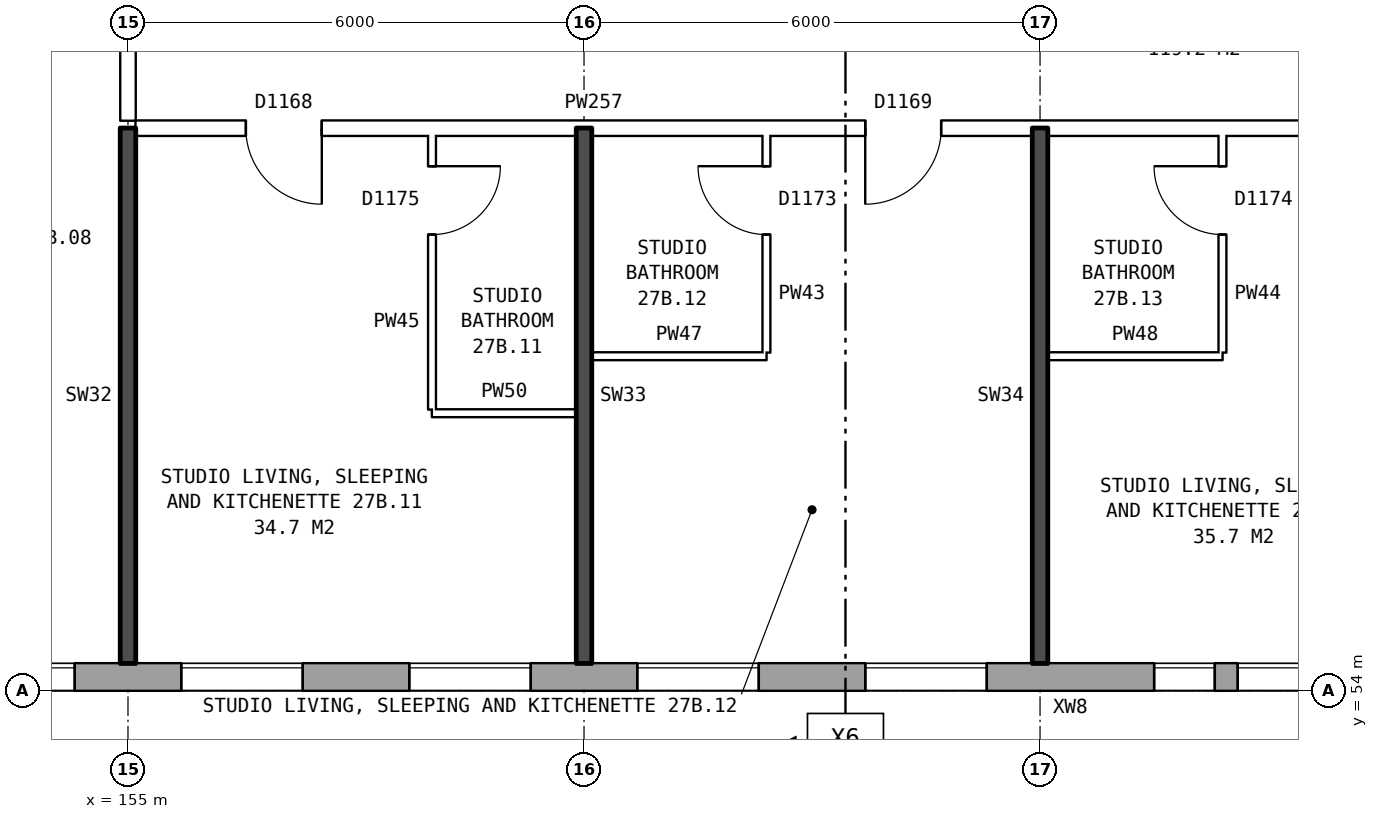
"""IFC4 building model, lengths in metres.
Left out: names, types, materials, properties, quantities, classifications, styles, units other than length and angle.
Written with IfcOpenShell. Run it as: python <this file> out.ifc"""

import sys

from ifc_helpers import new_model, si_unit, direction, frame, frame_2d, origin, place, context, subcontext, project, spatial, rectangle, extrude, element, fill, save


model = new_model("IFC4")
c1 = context("Model", 3, precision=1e-05, world=origin(), true_north=direction((0.0, 1.0)))
c2 = subcontext(c1, "Body", "Model", "MODEL_VIEW")
j1 = project(units=[si_unit("LENGTHUNIT", "METRE"), si_unit("PLANEANGLEUNIT", "RADIAN")], contexts=[c1])
p1 = place(None, origin())
s1 = spatial("IfcSite", under=j1, at=p1, CompositionType="ELEMENT")
p2 = place(p1, origin())
s2 = spatial("IfcBuilding", under=s1, at=p2, CompositionType="ELEMENT")
p3 = place(p2, frame((0.0, 0.0, 99.5)))
s3 = spatial("IfcBuildingStorey", under=s2, at=p3, CompositionType="ELEMENT", Elevation=99.5)
p4 = place(p3, frame((134.075, 54.18, 0.0), z_axis=(0.0, 0.0, 1.0), x_axis=(1.0, 0.0, 0.0)))
e1 = element("IfcWall", 1, at=p4, inside=s3, PredefinedType="STANDARD", context=c2, shape_type="SweptSolid", body=[
    extrude(rectangle(XDim=36.851, YDim=0.36, at=frame_2d((18.425, 0.0))), origin(), (0.0, 0.0, 1.0), 2.85),
])
p5 = place(p4, frame((0.3, 0.0, 0.8)))
e2 = element("IfcOpeningElement", 2, at=p5, cuts=e1, PredefinedType="OPENING", context=c2, shape_type="SweptSolid", body=[
    extrude(rectangle(XDim=1.0, YDim=1.8, at=frame_2d((0.5, 0.9))), frame((0.0, 0.19, 0.0), z_axis=(0.0, -1.0, 0.0), x_axis=(1.0, 0.0, 0.0)), (0.0, 0.0, 1.0), 0.38),
])
p6 = place(p4, frame((3.575, 0.0, 0.8)))
e3 = element("IfcOpeningElement", 3, at=p6, cuts=e1, PredefinedType="OPENING", context=c2, shape_type="SweptSolid", body=[
    extrude(rectangle(XDim=0.8, YDim=0.9, at=frame_2d((0.4, 0.45))), frame((0.0, 0.19, 0.0), z_axis=(0.0, -1.0, 0.0), x_axis=(1.0, 0.0, 0.0)), (0.0, 0.0, 1.0), 0.38),
])
p7 = place(p4, frame((6.625, 0.0, 0.8)))
e4 = element("IfcOpeningElement", 4, at=p7, cuts=e1, PredefinedType="OPENING", context=c2, shape_type="SweptSolid", body=[
    extrude(rectangle(XDim=1.6, YDim=1.8, at=frame_2d((0.8, 0.9))), frame((0.0, 0.19, 0.0), z_axis=(0.0, -1.0, 0.0), x_axis=(1.0, 0.0, 0.0)), (0.0, 0.0, 1.0), 0.38),
])
p8 = place(p4, frame((9.625, 0.0, 0.8)))
e5 = element("IfcOpeningElement", 5, at=p8, cuts=e1, PredefinedType="OPENING", context=c2, shape_type="SweptSolid", body=[
    extrude(rectangle(XDim=1.6, YDim=1.8, at=frame_2d((0.8, 0.9))), frame((0.0, 0.19, 0.0), z_axis=(0.0, -1.0, 0.0), x_axis=(1.0, 0.0, 0.0)), (0.0, 0.0, 1.0), 0.38),
])
p9 = place(p4, frame((12.625, 0.0, 0.8)))
e6 = element("IfcOpeningElement", 6, at=p9, cuts=e1, PredefinedType="OPENING", context=c2, shape_type="SweptSolid", body=[
    extrude(rectangle(XDim=1.6, YDim=1.8, at=frame_2d((0.8, 0.9))), frame((0.0, 0.19, 0.0), z_axis=(0.0, -1.0, 0.0), x_axis=(1.0, 0.0, 0.0)), (0.0, 0.0, 1.0), 0.38),
])
p10 = place(p4, frame((15.625, 0.0, 0.8)))
e7 = element("IfcOpeningElement", 7, at=p10, cuts=e1, PredefinedType="OPENING", context=c2, shape_type="SweptSolid", body=[
    extrude(rectangle(XDim=1.6, YDim=1.8, at=frame_2d((0.8, 0.9))), frame((0.0, 0.19, 0.0), z_axis=(0.0, -1.0, 0.0), x_axis=(1.0, 0.0, 0.0)), (0.0, 0.0, 1.0), 0.38),
])
p11 = place(p4, frame((18.625, 0.0, 0.8)))
e8 = element("IfcOpeningElement", 8, at=p11, cuts=e1, PredefinedType="OPENING", context=c2, shape_type="SweptSolid", body=[
    extrude(rectangle(XDim=1.6, YDim=1.8, at=frame_2d((0.8, 0.9))), frame((0.0, 0.19, 0.0), z_axis=(0.0, -1.0, 0.0), x_axis=(1.0, 0.0, 0.0)), (0.0, 0.0, 1.0), 0.38),
])
p12 = place(p4, frame((21.625, 0.0, 0.8)))
e9 = element("IfcOpeningElement", 9, at=p12, cuts=e1, PredefinedType="OPENING", context=c2, shape_type="SweptSolid", body=[
    extrude(rectangle(XDim=1.6, YDim=1.8, at=frame_2d((0.8, 0.9))), frame((0.0, 0.19, 0.0), z_axis=(0.0, -1.0, 0.0), x_axis=(1.0, 0.0, 0.0)), (0.0, 0.0, 1.0), 0.38),
])
p13 = place(p4, frame((24.625, 0.0, 0.8)))
e10 = element("IfcOpeningElement", 10, at=p13, cuts=e1, PredefinedType="OPENING", context=c2, shape_type="SweptSolid", body=[
    extrude(rectangle(XDim=1.6, YDim=1.8, at=frame_2d((0.8, 0.9))), frame((0.0, 0.19, 0.0), z_axis=(0.0, -1.0, 0.0), x_axis=(1.0, 0.0, 0.0)), (0.0, 0.0, 1.0), 0.38),
])
p14 = place(p4, frame((27.625, 0.0, 0.8)))
e11 = element("IfcOpeningElement", 11, at=p14, cuts=e1, PredefinedType="OPENING", context=c2, shape_type="SweptSolid", body=[
    extrude(rectangle(XDim=1.6, YDim=1.8, at=frame_2d((0.8, 0.9))), frame((0.0, 0.19, 0.0), z_axis=(0.0, -1.0, 0.0), x_axis=(1.0, 0.0, 0.0)), (0.0, 0.0, 1.0), 0.38),
])
p15 = place(p4, frame((30.625, 0.0, 0.8)))
e12 = element("IfcOpeningElement", 12, at=p15, cuts=e1, PredefinedType="OPENING", context=c2, shape_type="SweptSolid", body=[
    extrude(rectangle(XDim=1.6, YDim=1.8, at=frame_2d((0.8, 0.9))), frame((0.0, 0.19, 0.0), z_axis=(0.0, -1.0, 0.0), x_axis=(1.0, 0.0, 0.0)), (0.0, 0.0, 1.0), 0.38),
])
p16 = place(p4, frame((34.425, 0.0, 1.7)))
e13 = element("IfcOpeningElement", 13, at=p16, cuts=e1, PredefinedType="OPENING", context=c2, shape_type="SweptSolid", body=[
    extrude(rectangle(XDim=0.8, YDim=0.9, at=frame_2d((0.4, 0.45))), frame((0.0, 0.19, 0.0), z_axis=(0.0, -1.0, 0.0), x_axis=(1.0, 0.0, 0.0)), (0.0, 0.0, 1.0), 0.38),
])
p17 = place(p4, frame((1.6, 0.0, 1.7)))
e14 = element("IfcOpeningElement", 14, at=p17, cuts=e1, PredefinedType="OPENING", context=c2, shape_type="SweptSolid", body=[
    extrude(rectangle(XDim=0.8, YDim=0.9, at=frame_2d((0.4, 0.45))), frame((0.0, 0.19, 0.0), z_axis=(0.0, -1.0, 0.0), x_axis=(1.0, 0.0, 0.0)), (0.0, 0.0, 1.0), 0.38),
])
p18 = place(p4, frame((4.675, 0.0, 0.8)))
e15 = element("IfcOpeningElement", 15, at=p18, cuts=e1, PredefinedType="OPENING", context=c2, shape_type="SweptSolid", body=[
    extrude(rectangle(XDim=1.6, YDim=1.8, at=frame_2d((0.8, 0.9))), frame((0.0, 0.19, 0.0), z_axis=(0.0, -1.0, 0.0), x_axis=(1.0, 0.0, 0.0)), (0.0, 0.0, 1.0), 0.38),
])
p19 = place(p4, frame((35.525, 0.0, 0.8)))
e16 = element("IfcOpeningElement", 16, at=p19, cuts=e1, PredefinedType="OPENING", context=c2, shape_type="SweptSolid", body=[
    extrude(rectangle(XDim=1.0, YDim=1.8, at=frame_2d((0.5, 0.9))), frame((0.0, 0.19, 0.0), z_axis=(0.0, -1.0, 0.0), x_axis=(1.0, 0.0, 0.0)), (0.0, 0.0, 1.0), 0.38),
])
p20 = place(p3, frame((159.0, 57.65, 0.0), z_axis=(0.0, 0.0, 1.0), x_axis=(1.0, 0.0, 0.0)))
e17 = element("IfcWall", 17, at=p20, inside=s3, PredefinedType="PARTITIONING", context=c2, shape_type="SweptSolid", body=[
    extrude(rectangle(XDim=1.9, YDim=0.1, at=frame_2d((0.95, 0.0))), origin(), (0.0, 0.0, 1.0), 2.85),
])
for number, where, z_axis, x_axis in (
    (18, (161.1, 58.4, 0.0), (0.0, 0.0, 1.0), (1.0, 0.0, 0.0)),
    (19, (167.1, 58.4, 0.0), (0.0, 0.0, 1.0), (1.0, 0.0, 0.0)),
):
    element("IfcWall", number, at=place(p3, frame(where, z_axis=z_axis, x_axis=x_axis)), inside=s3, PredefinedType="PARTITIONING", context=c2, shape_type="SweptSolid", body=[
        extrude(rectangle(XDim=2.3, YDim=0.1, at=frame_2d((1.15, 0.0))), origin(), (0.0, 0.0, 1.0), 2.85),
    ])
p21 = place(p3, frame((155.1, 61.4, 0.0), z_axis=(0.0, 0.0, 1.0), x_axis=(1.0, 0.0, 0.0)))
e20 = element("IfcWall", 20, at=p21, inside=s3, PredefinedType="PARTITIONING", context=c2, shape_type="SweptSolid", body=[
    extrude(rectangle(XDim=18.54, YDim=0.2, at=frame_2d((9.27, 0.0))), origin(), (0.0, 0.0, 1.0), 2.85),
])
p22 = place(p21, frame((1.45, 0.0, 0.0)))
e21 = element("IfcOpeningElement", 21, at=p22, cuts=e20, PredefinedType="OPENING", context=c2, shape_type="SweptSolid", body=[
    extrude(rectangle(XDim=1.0, YDim=2.1, at=frame_2d((0.5, 1.05))), frame((0.0, 0.11, 0.0), z_axis=(0.0, -1.0, 0.0), x_axis=(1.0, 0.0, 0.0)), (0.0, 0.0, 1.0), 0.22),
])
p23 = place(p21, frame((9.6, 0.0, 0.0)))
e22 = element("IfcOpeningElement", 22, at=p23, cuts=e20, PredefinedType="OPENING", context=c2, shape_type="SweptSolid", body=[
    extrude(rectangle(XDim=1.0, YDim=2.1, at=frame_2d((0.5, 1.05))), frame((0.0, 0.11, 0.0), z_axis=(0.0, -1.0, 0.0), x_axis=(1.0, 0.0, 0.0)), (0.0, 0.0, 1.0), 0.22),
])
p24 = place(p21, frame((15.92, 0.0, 0.0)))
e23 = element("IfcOpeningElement", 23, at=p24, cuts=e20, PredefinedType="OPENING", context=c2, shape_type="SweptSolid", body=[
    extrude(rectangle(XDim=1.0, YDim=2.1, at=frame_2d((0.5, 1.05))), frame((0.0, 0.11, 0.0), z_axis=(0.0, -1.0, 0.0), x_axis=(1.0, 0.0, 0.0)), (0.0, 0.0, 1.0), 0.22),
])
p25 = place(p3, frame((155.0, 54.36, 0.0), z_axis=(0.0, 0.0, 1.0), x_axis=(0.0, 1.0, 0.0)))
e24 = element("IfcWall", 24, at=p25, inside=s3, PredefinedType="SOLIDWALL", context=c2, shape_type="SweptSolid", body=[
    extrude(rectangle(XDim=7.04, YDim=0.2, at=frame_2d((3.52, 0.0))), origin(), (0.0, 0.0, 1.0), 2.85),
])
p26 = place(p3, frame((155.0, 61.5, 0.0), z_axis=(0.0, 0.0, 1.0), x_axis=(0.0, 1.0, 0.0)))
e25 = element("IfcWall", 25, at=p26, inside=s3, PredefinedType="PARTITIONING", context=c2, shape_type="SweptSolid", body=[
    extrude(rectangle(XDim=2.2, YDim=0.2, at=frame_2d((1.1, 0.0))), origin(), (0.0, 0.0, 1.0), 2.85),
])
p27 = place(p3, frame((159.0, 57.7, 0.0), z_axis=(0.0, 0.0, 1.0), x_axis=(0.0, 1.0, 0.0)))
e26 = element("IfcWall", 26, at=p27, inside=s3, PredefinedType="PARTITIONING", context=c2, shape_type="SweptSolid", body=[
    extrude(rectangle(XDim=3.6, YDim=0.1, at=frame_2d((1.8, 0.0))), origin(), (0.0, 0.0, 1.0), 2.85),
])
p28 = place(p27, frame((2.3, 0.0, 0.0)))
e27 = element("IfcOpeningElement", 27, at=p28, cuts=e26, PredefinedType="OPENING", context=c2, shape_type="SweptSolid", body=[
    extrude(rectangle(XDim=0.9, YDim=2.1, at=frame_2d((0.45, 1.05))), frame((0.0, 0.06, 0.0), z_axis=(0.0, -1.0, 0.0), x_axis=(1.0, 0.0, 0.0)), (0.0, 0.0, 1.0), 0.12),
])
p29 = place(p3, frame((161.0, 54.36, 0.0), z_axis=(0.0, 0.0, 1.0), x_axis=(0.0, 1.0, 0.0)))
e28 = element("IfcWall", 28, at=p29, inside=s3, PredefinedType="SOLIDWALL", context=c2, shape_type="SweptSolid", body=[
    extrude(rectangle(XDim=7.04, YDim=0.2, at=frame_2d((3.52, 0.0))), origin(), (0.0, 0.0, 1.0), 2.85),
])
p30 = place(p3, frame((163.4, 58.45, 0.0), z_axis=(0.0, 0.0, 1.0), x_axis=(0.0, 1.0, 0.0)))
e29 = element("IfcWall", 29, at=p30, inside=s3, PredefinedType="PARTITIONING", context=c2, shape_type="SweptSolid", body=[
    extrude(rectangle(XDim=2.85, YDim=0.1, at=frame_2d((1.425, 0.0))), origin(), (0.0, 0.0, 1.0), 2.85),
])
p31 = place(p30, frame((1.55, 0.0, 0.0)))
e30 = element("IfcOpeningElement", 30, at=p31, cuts=e29, PredefinedType="OPENING", context=c2, shape_type="SweptSolid", body=[
    extrude(rectangle(XDim=0.9, YDim=2.1, at=frame_2d((0.45, 1.05))), frame((0.0, 0.06, 0.0), z_axis=(0.0, -1.0, 0.0), x_axis=(1.0, 0.0, 0.0)), (0.0, 0.0, 1.0), 0.12),
])
p32 = place(p3, frame((167.0, 54.36, 0.0), z_axis=(0.0, 0.0, 1.0), x_axis=(0.0, 1.0, 0.0)))
e31 = element("IfcWall", 31, at=p32, inside=s3, PredefinedType="SOLIDWALL", context=c2, shape_type="SweptSolid", body=[
    extrude(rectangle(XDim=7.04, YDim=0.2, at=frame_2d((3.52, 0.0))), origin(), (0.0, 0.0, 1.0), 2.85),
])
p33 = place(p3, frame((169.4, 58.45, 0.0), z_axis=(0.0, 0.0, 1.0), x_axis=(0.0, 1.0, 0.0)))
e32 = element("IfcWall", 32, at=p33, inside=s3, PredefinedType="PARTITIONING", context=c2, shape_type="SweptSolid", body=[
    extrude(rectangle(XDim=2.85, YDim=0.1, at=frame_2d((1.425, 0.0))), origin(), (0.0, 0.0, 1.0), 2.85),
])
p34 = place(p33, frame((1.55, 0.0, 0.0)))
e33 = element("IfcOpeningElement", 33, at=p34, cuts=e32, PredefinedType="OPENING", context=c2, shape_type="SweptSolid", body=[
    extrude(rectangle(XDim=0.9, YDim=2.1, at=frame_2d((0.45, 1.05))), frame((0.0, 0.06, 0.0), z_axis=(0.0, -1.0, 0.0), x_axis=(1.0, 0.0, 0.0)), (0.0, 0.0, 1.0), 0.12),
])
p35 = place(p11, origin())
e34 = element("IfcWindow", 34, at=p35, inside=s3, PartitioningType="SINGLE_PANEL", PredefinedType="WINDOW", context=c2, shape_type="SweptSolid", body=[
    extrude(rectangle(XDim=1.6, YDim=1.8, at=frame_2d((0.8, 0.9))), frame((0.0, 0.15, 0.0), z_axis=(0.0, -1.0, 0.0), x_axis=(1.0, 0.0, 0.0)), (0.0, 0.0, 1.0), 0.06),
])
fill(e8, e34)
p36 = place(p12, origin())
e35 = element("IfcWindow", 35, at=p36, inside=s3, PartitioningType="SINGLE_PANEL", PredefinedType="WINDOW", context=c2, shape_type="SweptSolid", body=[
    extrude(rectangle(XDim=1.6, YDim=1.8, at=frame_2d((0.8, 0.9))), frame((0.0, 0.15, 0.0), z_axis=(0.0, -1.0, 0.0), x_axis=(1.0, 0.0, 0.0)), (0.0, 0.0, 1.0), 0.06),
])
fill(e9, e35)
p37 = place(p13, origin())
e36 = element("IfcWindow", 36, at=p37, inside=s3, PartitioningType="SINGLE_PANEL", PredefinedType="WINDOW", context=c2, shape_type="SweptSolid", body=[
    extrude(rectangle(XDim=1.6, YDim=1.8, at=frame_2d((0.8, 0.9))), frame((0.0, 0.15, 0.0), z_axis=(0.0, -1.0, 0.0), x_axis=(1.0, 0.0, 0.0)), (0.0, 0.0, 1.0), 0.06),
])
fill(e10, e36)
p38 = place(p14, origin())
e37 = element("IfcWindow", 37, at=p38, inside=s3, PartitioningType="SINGLE_PANEL", PredefinedType="WINDOW", context=c2, shape_type="SweptSolid", body=[
    extrude(rectangle(XDim=1.6, YDim=1.8, at=frame_2d((0.8, 0.9))), frame((0.0, 0.15, 0.0), z_axis=(0.0, -1.0, 0.0), x_axis=(1.0, 0.0, 0.0)), (0.0, 0.0, 1.0), 0.06),
])
fill(e11, e37)
p39 = place(p15, origin())
e38 = element("IfcWindow", 38, at=p39, inside=s3, PartitioningType="SINGLE_PANEL", PredefinedType="WINDOW", context=c2, shape_type="SweptSolid", body=[
    extrude(rectangle(XDim=1.6, YDim=1.8, at=frame_2d((0.8, 0.9))), frame((0.0, 0.15, 0.0), z_axis=(0.0, -1.0, 0.0), x_axis=(1.0, 0.0, 0.0)), (0.0, 0.0, 1.0), 0.06),
])
fill(e12, e38)
p40 = place(p16, origin())
e39 = element("IfcWindow", 39, at=p40, inside=s3, PartitioningType="SINGLE_PANEL", PredefinedType="WINDOW", context=c2, shape_type="SweptSolid", body=[
    extrude(rectangle(XDim=0.8, YDim=0.9, at=frame_2d((0.4, 0.45))), frame((0.0, 0.15, 0.0), z_axis=(0.0, -1.0, 0.0), x_axis=(1.0, 0.0, 0.0)), (0.0, 0.0, 1.0), 0.06),
])
fill(e13, e39)
p41 = place(p22, frame((1.0, 0.0, 0.0), z_axis=(0.0, 0.0, 1.0), x_axis=(-1.0, 0.0, 0.0)))
e40 = element("IfcDoor", 40, at=p41, inside=s3, OperationType="SINGLE_SWING_LEFT", PredefinedType="DOOR", context=c2, shape_type="SweptSolid", body=[
    extrude(rectangle(XDim=1.0, YDim=2.1, at=frame_2d((0.5, 1.05))), frame((0.0, 0.025, 0.0), z_axis=(0.0, -1.0, 0.0), x_axis=(1.0, 0.0, 0.0)), (0.0, 0.0, 1.0), 0.05),
])
fill(e21, e40)
p42 = place(p28, frame((0.9, 0.0, 0.0), z_axis=(0.0, 0.0, 1.0), x_axis=(-1.0, 0.0, 0.0)))
e41 = element("IfcDoor", 41, at=p42, inside=s3, OperationType="SINGLE_SWING_LEFT", PredefinedType="DOOR", context=c2, shape_type="SweptSolid", body=[
    extrude(rectangle(XDim=0.9, YDim=2.1, at=frame_2d((0.45, 1.05))), frame((0.0, 0.025, 0.0), z_axis=(0.0, -1.0, 0.0), x_axis=(1.0, 0.0, 0.0)), (0.0, 0.0, 1.0), 0.05),
])
fill(e27, e41)
p43 = place(p23, frame((1.0, 0.0, 0.0), z_axis=(0.0, 0.0, 1.0), x_axis=(-1.0, 0.0, 0.0)))
e42 = element("IfcDoor", 42, at=p43, inside=s3, OperationType="SINGLE_SWING_RIGHT", PredefinedType="DOOR", context=c2, shape_type="SweptSolid", body=[
    extrude(rectangle(XDim=1.0, YDim=2.1, at=frame_2d((0.5, 1.05))), frame((0.0, 0.025, 0.0), z_axis=(0.0, -1.0, 0.0), x_axis=(1.0, 0.0, 0.0)), (0.0, 0.0, 1.0), 0.05),
])
fill(e22, e42)
p44 = place(p31, origin())
e43 = element("IfcDoor", 43, at=p44, inside=s3, OperationType="SINGLE_SWING_RIGHT", PredefinedType="DOOR", context=c2, shape_type="SweptSolid", body=[
    extrude(rectangle(XDim=0.9, YDim=2.1, at=frame_2d((0.45, 1.05))), frame((0.0, 0.025, 0.0), z_axis=(0.0, -1.0, 0.0), x_axis=(1.0, 0.0, 0.0)), (0.0, 0.0, 1.0), 0.05),
])
fill(e30, e43)
p45 = place(p34, origin())
e44 = element("IfcDoor", 44, at=p45, inside=s3, OperationType="SINGLE_SWING_RIGHT", PredefinedType="DOOR", context=c2, shape_type="SweptSolid", body=[
    extrude(rectangle(XDim=0.9, YDim=2.1, at=frame_2d((0.45, 1.05))), frame((0.0, 0.025, 0.0), z_axis=(0.0, -1.0, 0.0), x_axis=(1.0, 0.0, 0.0)), (0.0, 0.0, 1.0), 0.05),
])
fill(e33, e44)
p46 = place(p19, origin())
e45 = element("IfcWindow", 45, at=p46, inside=s3, PartitioningType="SINGLE_PANEL", PredefinedType="WINDOW", context=c2, shape_type="SweptSolid", body=[
    extrude(rectangle(XDim=1.0, YDim=1.8, at=frame_2d((0.5, 0.9))), frame((0.0, 0.15, 0.0), z_axis=(0.0, -1.0, 0.0), x_axis=(1.0, 0.0, 0.0)), (0.0, 0.0, 1.0), 0.06),
])
fill(e16, e45)
save(model, sys.argv[1])
